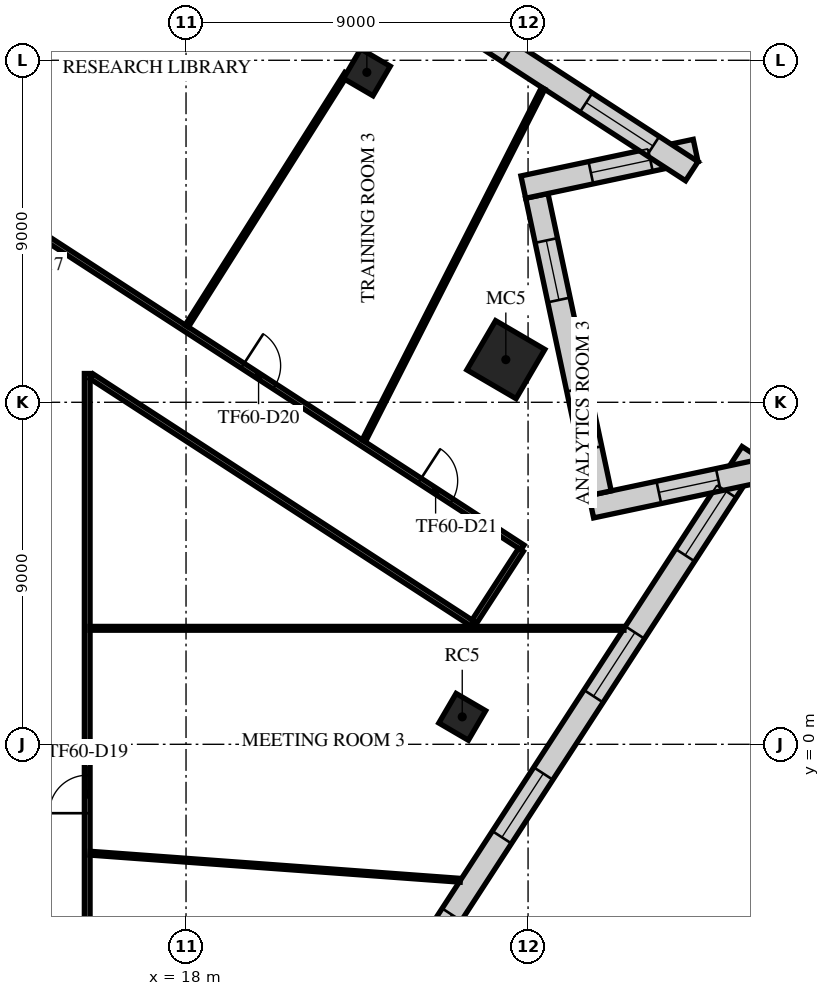
"""IFC4 building model, lengths in metres.
Left out: names, types, materials, properties, quantities, classifications, styles, units other than length and angle.
Written with IfcOpenShell. Run it as: python <this file> out.ifc"""

import sys

from ifc_helpers import new_model, si_unit, direction, frame, frame_2d, origin, origin_2d, place, context, subcontext, project, spatial, rectangle, extrude, element, fill, save


model = new_model("IFC4")
c1 = context("Model", 3, precision=1e-05, world=origin(), true_north=direction((0.0, 1.0)))
c2 = subcontext(c1, "Body", "Model", "MODEL_VIEW")
j1 = project(units=[si_unit("LENGTHUNIT", "METRE"), si_unit("PLANEANGLEUNIT", "RADIAN")], contexts=[c1])
p1 = place(None, origin())
s1 = spatial("IfcSite", under=j1, at=p1, CompositionType="ELEMENT")
p2 = place(p1, origin())
s2 = spatial("IfcBuilding", under=s1, at=p2, CompositionType="ELEMENT")
p3 = place(p2, frame((0.0, 0.0, 254.9)))
s3 = spatial("IfcBuildingStorey", under=s2, at=p3, CompositionType="ELEMENT", Elevation=254.9)
p4 = place(p3, frame((25.268, 0.722, 0.0), z_axis=(0.0, 0.0, 1.0), x_axis=(0.504643651291, 0.863327739165, 0.0)))
e1 = element("IfcColumn", 1, at=p4, inside=s3, PredefinedType="COLUMN", context=c2, shape_type="SweptSolid", body=[
    extrude(rectangle(XDim=0.9, YDim=0.9, at=origin_2d()), origin(), (0.0, 0.0, 1.0), 4.0),
])
p5 = place(p3, frame((26.415, 10.122, 0.0), z_axis=(0.0, 0.0, 1.0), x_axis=(0.504643651291, 0.863327739165, 0.0)))
e2 = element("IfcColumn", 2, at=p5, inside=s3, PredefinedType="COLUMN", context=c2, shape_type="SweptSolid", body=[
    extrude(rectangle(XDim=1.5, YDim=1.5, at=origin_2d()), origin(), (0.0, 0.0, 1.0), 4.0),
])
p6 = place(p3, frame((22.758, 17.682, 0.0), z_axis=(0.0, 0.0, 1.0), x_axis=(0.504643651291, 0.863327739165, 0.0)))
e3 = element("IfcColumn", 3, at=p6, inside=s3, PredefinedType="COLUMN", context=c2, shape_type="SweptSolid", body=[
    extrude(rectangle(XDim=0.9, YDim=0.9, at=origin_2d()), origin(), (0.0, 0.0, 1.0), 4.0),
])
p7 = place(p3, frame((6.367, -33.16, 0.0), z_axis=(0.0, 0.0, 1.0), x_axis=(0.544637371147, 0.838671648472, 0.0)))
e4 = element("IfcWall", 4, at=p7, inside=s3, PredefinedType="STANDARD", context=c2, shape_type="SweptSolid", body=[
    extrude(rectangle(XDim=48.686, YDim=0.6, at=frame_2d((24.343, 0.0))), origin(), (0.0, 0.0, 1.0), 3.64),
])
p8 = place(p7, frame((1.213, 0.0, 0.9)))
e5 = element("IfcOpeningElement", 5, at=p8, cuts=e4, PredefinedType="OPENING", context=c2, shape_type="SweptSolid", body=[
    extrude(rectangle(XDim=2.0, YDim=2.1, at=frame_2d((1.0, 1.05))), frame((0.0, 0.31, 0.0), z_axis=(0.0, -1.0, 0.0), x_axis=(1.0, 0.0, 0.0)), (0.0, 0.0, 1.0), 0.62),
])
p9 = place(p7, frame((5.639, 0.0, 0.9)))
e6 = element("IfcOpeningElement", 6, at=p9, cuts=e4, PredefinedType="OPENING", context=c2, shape_type="SweptSolid", body=[
    extrude(rectangle(XDim=2.0, YDim=2.1, at=frame_2d((1.0, 1.05))), frame((0.0, 0.31, 0.0), z_axis=(0.0, -1.0, 0.0), x_axis=(1.0, 0.0, 0.0)), (0.0, 0.0, 1.0), 0.62),
])
p10 = place(p7, frame((14.491, 0.0, 0.9)))
e7 = element("IfcOpeningElement", 7, at=p10, cuts=e4, PredefinedType="OPENING", context=c2, shape_type="SweptSolid", body=[
    extrude(rectangle(XDim=2.0, YDim=2.1, at=frame_2d((1.0, 1.05))), frame((0.0, 0.31, 0.0), z_axis=(0.0, -1.0, 0.0), x_axis=(1.0, 0.0, 0.0)), (0.0, 0.0, 1.0), 0.62),
])
p11 = place(p7, frame((18.917, 0.0, 0.9)))
e8 = element("IfcOpeningElement", 8, at=p11, cuts=e4, PredefinedType="OPENING", context=c2, shape_type="SweptSolid", body=[
    extrude(rectangle(XDim=2.0, YDim=2.1, at=frame_2d((1.0, 1.05))), frame((0.0, 0.31, 0.0), z_axis=(0.0, -1.0, 0.0), x_axis=(1.0, 0.0, 0.0)), (0.0, 0.0, 1.0), 0.62),
])
p12 = place(p7, frame((23.343, 0.0, 0.9)))
e9 = element("IfcOpeningElement", 9, at=p12, cuts=e4, PredefinedType="OPENING", context=c2, shape_type="SweptSolid", body=[
    extrude(rectangle(XDim=2.0, YDim=2.1, at=frame_2d((1.0, 1.05))), frame((0.0, 0.31, 0.0), z_axis=(0.0, -1.0, 0.0), x_axis=(1.0, 0.0, 0.0)), (0.0, 0.0, 1.0), 0.62),
])
p13 = place(p7, frame((27.769, 0.0, 0.9)))
e10 = element("IfcOpeningElement", 10, at=p13, cuts=e4, PredefinedType="OPENING", context=c2, shape_type="SweptSolid", body=[
    extrude(rectangle(XDim=2.0, YDim=2.1, at=frame_2d((1.0, 1.05))), frame((0.0, 0.31, 0.0), z_axis=(0.0, -1.0, 0.0), x_axis=(1.0, 0.0, 0.0)), (0.0, 0.0, 1.0), 0.62),
])
p14 = place(p7, frame((32.195, 0.0, 0.9)))
e11 = element("IfcOpeningElement", 11, at=p14, cuts=e4, PredefinedType="OPENING", context=c2, shape_type="SweptSolid", body=[
    extrude(rectangle(XDim=2.0, YDim=2.1, at=frame_2d((1.0, 1.05))), frame((0.0, 0.31, 0.0), z_axis=(0.0, -1.0, 0.0), x_axis=(1.0, 0.0, 0.0)), (0.0, 0.0, 1.0), 0.62),
])
p15 = place(p7, frame((36.621, 0.0, 0.9)))
e12 = element("IfcOpeningElement", 12, at=p15, cuts=e4, PredefinedType="OPENING", context=c2, shape_type="SweptSolid", body=[
    extrude(rectangle(XDim=2.0, YDim=2.1, at=frame_2d((1.0, 1.05))), frame((0.0, 0.31, 0.0), z_axis=(0.0, -1.0, 0.0), x_axis=(1.0, 0.0, 0.0)), (0.0, 0.0, 1.0), 0.62),
])
p16 = place(p7, frame((41.047, 0.0, 0.9)))
e13 = element("IfcOpeningElement", 13, at=p16, cuts=e4, PredefinedType="OPENING", context=c2, shape_type="SweptSolid", body=[
    extrude(rectangle(XDim=2.0, YDim=2.1, at=frame_2d((1.0, 1.05))), frame((0.0, 0.31, 0.0), z_axis=(0.0, -1.0, 0.0), x_axis=(1.0, 0.0, 0.0)), (0.0, 0.0, 1.0), 0.62),
])
p17 = place(p7, frame((45.473, 0.0, 0.9)))
e14 = element("IfcOpeningElement", 14, at=p17, cuts=e4, PredefinedType="OPENING", context=c2, shape_type="SweptSolid", body=[
    extrude(rectangle(XDim=2.0, YDim=2.1, at=frame_2d((1.0, 1.05))), frame((0.0, 0.31, 0.0), z_axis=(0.0, -1.0, 0.0), x_axis=(1.0, 0.0, 0.0)), (0.0, 0.0, 1.0), 0.62),
])
p18 = place(p3, frame((33.197, 7.215, 0.0), z_axis=(0.0, 0.0, 1.0), x_axis=(-0.978143321118, -0.207931823809, 0.0)))
e15 = element("IfcWall", 15, at=p18, inside=s3, PredefinedType="STANDARD", context=c2, shape_type="SweptSolid", body=[
    extrude(rectangle(XDim=4.635, YDim=0.6, at=frame_2d((2.318, 0.0))), origin(), (0.0, 0.0, 1.0), 3.64),
])
p19 = place(p18, frame((1.218, 0.0, 0.9)))
e16 = element("IfcOpeningElement", 16, at=p19, cuts=e15, PredefinedType="OPENING", context=c2, shape_type="SweptSolid", body=[
    extrude(rectangle(XDim=1.6, YDim=2.1, at=frame_2d((0.8, 1.05))), frame((0.0, 0.31, 0.0), z_axis=(0.0, -1.0, 0.0), x_axis=(1.0, 0.0, 0.0)), (0.0, 0.0, 1.0), 0.62),
])
p20 = place(p3, frame((28.894, 6.606, 0.0), z_axis=(0.0, 0.0, 1.0), x_axis=(-0.207886494942, 0.978152955943, 0.0)))
e17 = element("IfcWall", 17, at=p20, inside=s3, PredefinedType="STANDARD", context=c2, shape_type="SweptSolid", body=[
    extrude(rectangle(XDim=8.0, YDim=0.6, at=frame_2d((4.0, 0.0))), origin(), (0.0, 0.0, 1.0), 3.64),
])
p21 = place(p20, frame((1.2, 0.0, 0.9)))
e18 = element("IfcOpeningElement", 18, at=p21, cuts=e17, PredefinedType="OPENING", context=c2, shape_type="SweptSolid", body=[
    extrude(rectangle(XDim=1.6, YDim=2.1, at=frame_2d((0.8, 1.05))), frame((0.0, 0.31, 0.0), z_axis=(0.0, -1.0, 0.0), x_axis=(1.0, 0.0, 0.0)), (0.0, 0.0, 1.0), 0.62),
])
p22 = place(p20, frame((5.2, 0.0, 0.9)))
e19 = element("IfcOpeningElement", 19, at=p22, cuts=e17, PredefinedType="OPENING", context=c2, shape_type="SweptSolid", body=[
    extrude(rectangle(XDim=1.6, YDim=2.1, at=frame_2d((0.8, 1.05))), frame((0.0, 0.31, 0.0), z_axis=(0.0, -1.0, 0.0), x_axis=(1.0, 0.0, 0.0)), (0.0, 0.0, 1.0), 0.62),
])
p23 = place(p3, frame((26.875, 14.663, 0.0), z_axis=(0.0, 0.0, 1.0), x_axis=(0.978145598061, 0.207921112429, 0.0)))
e20 = element("IfcWall", 20, at=p23, inside=s3, PredefinedType="STANDARD", context=c2, shape_type="SweptSolid", body=[
    extrude(rectangle(XDim=4.636, YDim=0.6, at=frame_2d((2.318, 0.0))), origin(), (0.0, 0.0, 1.0), 3.64),
])
p24 = place(p23, frame((1.818, 0.0, 0.9)))
e21 = element("IfcOpeningElement", 21, at=p24, cuts=e20, PredefinedType="OPENING", context=c2, shape_type="SweptSolid", body=[
    extrude(rectangle(XDim=1.6, YDim=2.1, at=frame_2d((0.8, 1.05))), frame((0.0, 0.31, 0.0), z_axis=(0.0, -1.0, 0.0), x_axis=(1.0, 0.0, 0.0)), (0.0, 0.0, 1.0), 0.62),
])
p25 = place(p3, frame((31.308, 15.082, 0.0), z_axis=(0.0, 0.0, 1.0), x_axis=(-0.838672242303, 0.544636456721, 0.0)))
e22 = element("IfcWall", 22, at=p25, inside=s3, PredefinedType="STANDARD", context=c2, shape_type="SweptSolid", body=[
    extrude(rectangle(XDim=36.243, YDim=0.6, at=frame_2d((18.122, 0.0))), origin(), (0.0, 0.0, 1.0), 3.64),
])
p26 = place(p25, frame((1.215, 0.0, 0.9)))
e23 = element("IfcOpeningElement", 23, at=p26, cuts=e22, PredefinedType="OPENING", context=c2, shape_type="SweptSolid", body=[
    extrude(rectangle(XDim=2.1, YDim=2.1, at=frame_2d((1.05, 1.05))), frame((0.0, 0.31, 0.0), z_axis=(0.0, -1.0, 0.0), x_axis=(1.0, 0.0, 0.0)), (0.0, 0.0, 1.0), 0.62),
])
p27 = place(p25, frame((5.746, 0.0, 0.9)))
e24 = element("IfcOpeningElement", 24, at=p27, cuts=e22, PredefinedType="OPENING", context=c2, shape_type="SweptSolid", body=[
    extrude(rectangle(XDim=2.1, YDim=2.1, at=frame_2d((1.05, 1.05))), frame((0.0, 0.31, 0.0), z_axis=(0.0, -1.0, 0.0), x_axis=(1.0, 0.0, 0.0)), (0.0, 0.0, 1.0), 0.62),
])
p28 = place(p25, frame((10.276, 0.0, 0.9)))
e25 = element("IfcOpeningElement", 25, at=p28, cuts=e22, PredefinedType="OPENING", context=c2, shape_type="SweptSolid", body=[
    extrude(rectangle(XDim=2.1, YDim=2.1, at=frame_2d((1.05, 1.05))), frame((0.0, 0.31, 0.0), z_axis=(0.0, -1.0, 0.0), x_axis=(1.0, 0.0, 0.0)), (0.0, 0.0, 1.0), 0.62),
])
p29 = place(p25, frame((14.806, 0.0, 0.9)))
e26 = element("IfcOpeningElement", 26, at=p29, cuts=e22, PredefinedType="OPENING", context=c2, shape_type="SweptSolid", body=[
    extrude(rectangle(XDim=2.1, YDim=2.1, at=frame_2d((1.05, 1.05))), frame((0.0, 0.31, 0.0), z_axis=(0.0, -1.0, 0.0), x_axis=(1.0, 0.0, 0.0)), (0.0, 0.0, 1.0), 0.62),
])
p30 = place(p25, frame((19.337, 0.0, 0.9)))
e27 = element("IfcOpeningElement", 27, at=p30, cuts=e22, PredefinedType="OPENING", context=c2, shape_type="SweptSolid", body=[
    extrude(rectangle(XDim=2.1, YDim=2.1, at=frame_2d((1.05, 1.05))), frame((0.0, 0.31, 0.0), z_axis=(0.0, -1.0, 0.0), x_axis=(1.0, 0.0, 0.0)), (0.0, 0.0, 1.0), 0.62),
])
p31 = place(p25, frame((23.867, 0.0, 0.9)))
e28 = element("IfcOpeningElement", 28, at=p31, cuts=e22, PredefinedType="OPENING", context=c2, shape_type="SweptSolid", body=[
    extrude(rectangle(XDim=2.1, YDim=2.1, at=frame_2d((1.05, 1.05))), frame((0.0, 0.31, 0.0), z_axis=(0.0, -1.0, 0.0), x_axis=(1.0, 0.0, 0.0)), (0.0, 0.0, 1.0), 0.62),
])
p32 = place(p25, frame((28.398, 0.0, 0.9)))
e29 = element("IfcOpeningElement", 29, at=p32, cuts=e22, PredefinedType="OPENING", context=c2, shape_type="SweptSolid", body=[
    extrude(rectangle(XDim=2.1, YDim=2.1, at=frame_2d((1.05, 1.05))), frame((0.0, 0.31, 0.0), z_axis=(0.0, -1.0, 0.0), x_axis=(1.0, 0.0, 0.0)), (0.0, 0.0, 1.0), 0.62),
])
p33 = place(p25, frame((32.928, 0.0, 0.9)))
e30 = element("IfcOpeningElement", 30, at=p33, cuts=e22, PredefinedType="OPENING", context=c2, shape_type="SweptSolid", body=[
    extrude(rectangle(XDim=2.1, YDim=2.1, at=frame_2d((1.05, 1.05))), frame((0.0, 0.31, 0.0), z_axis=(0.0, -1.0, 0.0), x_axis=(1.0, 0.0, 0.0)), (0.0, 0.0, 1.0), 0.62),
])
p34 = place(p3, frame((-6.127, 26.598, 0.0), z_axis=(0.0, 0.0, 1.0), x_axis=(0.838670911559, -0.544638505897, 0.0)))
e31 = element("IfcWall", 31, at=p34, inside=s3, PredefinedType="PARTITIONING", context=c2, shape_type="SweptSolid", body=[
    extrude(rectangle(XDim=39.325, YDim=0.15, at=frame_2d((19.663, 0.0))), origin(), (0.0, 0.0, 1.0), 3.04),
])
p35 = place(p34, frame((9.3, 0.0, 0.0)))
e32 = element("IfcOpeningElement", 32, at=p35, cuts=e31, PredefinedType="OPENING", context=c2, shape_type="SweptSolid", body=[
    extrude(rectangle(XDim=1.8, YDim=2.1, at=frame_2d((0.9, 1.05))), frame((0.0, 0.085, 0.0), z_axis=(0.0, -1.0, 0.0), x_axis=(1.0, 0.0, 0.0)), (0.0, 0.0, 1.0), 0.17),
])
p36 = place(p34, frame((12.185, 0.0, 0.0)))
e33 = element("IfcOpeningElement", 33, at=p36, cuts=e31, PredefinedType="OPENING", context=c2, shape_type="SweptSolid", body=[
    extrude(rectangle(XDim=1.0, YDim=2.1, at=frame_2d((0.5, 1.05))), frame((0.0, 0.085, 0.0), z_axis=(0.0, -1.0, 0.0), x_axis=(1.0, 0.0, 0.0)), (0.0, 0.0, 1.0), 0.17),
])
p37 = place(p34, frame((23.155, 0.0, 0.0)))
e34 = element("IfcOpeningElement", 34, at=p37, cuts=e31, PredefinedType="OPENING", context=c2, shape_type="SweptSolid", body=[
    extrude(rectangle(XDim=1.0, YDim=2.1, at=frame_2d((0.5, 1.05))), frame((0.0, 0.085, 0.0), z_axis=(0.0, -1.0, 0.0), x_axis=(1.0, 0.0, 0.0)), (0.0, 0.0, 1.0), 0.17),
])
p38 = place(p34, frame((30.544, 0.0, 0.0)))
e35 = element("IfcOpeningElement", 35, at=p38, cuts=e31, PredefinedType="OPENING", context=c2, shape_type="SweptSolid", body=[
    extrude(rectangle(XDim=1.0, YDim=2.1, at=frame_2d((0.5, 1.05))), frame((0.0, 0.085, 0.0), z_axis=(0.0, -1.0, 0.0), x_axis=(1.0, 0.0, 0.0)), (0.0, 0.0, 1.0), 0.17),
])
p39 = place(p34, frame((36.099, 0.0, 0.0)))
e36 = element("IfcOpeningElement", 36, at=p39, cuts=e31, PredefinedType="OPENING", context=c2, shape_type="SweptSolid", body=[
    extrude(rectangle(XDim=1.0, YDim=2.1, at=frame_2d((0.5, 1.05))), frame((0.0, 0.085, 0.0), z_axis=(0.0, -1.0, 0.0), x_axis=(1.0, 0.0, 0.0)), (0.0, 0.0, 1.0), 0.17),
])
p40 = place(p3, frame((15.4, -15.325, 0.0), z_axis=(0.0, 0.0, 1.0), x_axis=(0.0, 1.0, 0.0)))
e37 = element("IfcWall", 37, at=p40, inside=s3, PredefinedType="PARTITIONING", context=c2, shape_type="SweptSolid", body=[
    extrude(rectangle(XDim=25.082, YDim=0.15, at=frame_2d((12.541, 0.0))), origin(), (0.0, 0.0, 1.0), 3.24),
])
p41 = place(p40, frame((6.847, 0.0, 0.0)))
e38 = element("IfcOpeningElement", 38, at=p41, cuts=e37, PredefinedType="OPENING", context=c2, shape_type="SweptSolid", body=[
    extrude(rectangle(XDim=1.0, YDim=2.1, at=frame_2d((0.5, 1.05))), frame((0.0, 0.085, 0.0), z_axis=(0.0, -1.0, 0.0), x_axis=(1.0, 0.0, 0.0)), (0.0, 0.0, 1.0), 0.17),
])
p42 = place(p40, frame((13.512, 0.0, 0.0)))
e39 = element("IfcOpeningElement", 39, at=p42, cuts=e37, PredefinedType="OPENING", context=c2, shape_type="SweptSolid", body=[
    extrude(rectangle(XDim=1.0, YDim=2.1, at=frame_2d((0.5, 1.05))), frame((0.0, 0.085, 0.0), z_axis=(0.0, -1.0, 0.0), x_axis=(1.0, 0.0, 0.0)), (0.0, 0.0, 1.0), 0.17),
])
p43 = place(p3, frame((15.516, 9.682, 0.0), z_axis=(0.0, 0.0, 1.0), x_axis=(0.838687901934, -0.544612342083, 0.0)))
e40 = element("IfcWall", 40, at=p43, inside=s3, PredefinedType="PARTITIONING", context=c2, shape_type="SweptSolid", body=[
    extrude(rectangle(XDim=11.961, YDim=0.15, at=frame_2d((5.98, 0.0))), origin(), (0.0, 0.0, 1.0), 3.04),
])
p44 = place(p3, frame((25.588, 3.231, 0.0), z_axis=(0.0, 0.0, 1.0), x_axis=(0.544690717141, 0.838637002916, 0.0)))
e41 = element("IfcWall", 41, at=p44, inside=s3, PredefinedType="PARTITIONING", context=c2, shape_type="SweptSolid", body=[
    extrude(rectangle(XDim=2.249, YDim=0.15, at=frame_2d((1.125, 0.0))), origin(), (0.0, 0.0, 1.0), 3.04),
])
p45 = place(p3, frame((11.194, 15.445, 0.0), z_axis=(0.0, 0.0, 1.0), x_axis=(0.461705411455, 0.887033321264, 0.0)))
e42 = element("IfcWall", 42, at=p45, inside=s3, PredefinedType="PARTITIONING", context=c2, shape_type="SweptSolid", body=[
    extrude(rectangle(XDim=10.396, YDim=0.1, at=frame_2d((5.198, 0.0))), origin(), (0.0, 0.0, 1.0), 3.04),
])
p46 = place(p3, frame((15.475, 3.052, 0.0), z_axis=(0.0, 0.0, 1.0), x_axis=(1.0, 0.0, 0.0)))
e43 = element("IfcWall", 43, at=p46, inside=s3, PredefinedType="PARTITIONING", context=c2, shape_type="SweptSolid", body=[
    extrude(rectangle(XDim=14.048, YDim=0.1, at=frame_2d((7.024, 0.0))), origin(), (0.0, 0.0, 1.0), 3.04),
])
p47 = place(p3, frame((15.479, -2.866, 0.0), z_axis=(0.0, 0.0, 1.0), x_axis=(0.997329416564, -0.073034477181, 0.0)))
e44 = element("IfcWall", 44, at=p47, inside=s3, PredefinedType="PARTITIONING", context=c2, shape_type="SweptSolid", body=[
    extrude(rectangle(XDim=9.764, YDim=0.1, at=frame_2d((4.882, 0.0))), origin(), (0.0, 0.0, 1.0), 3.04),
])
p48 = place(p3, frame((18.021, 11.007, 0.0), z_axis=(0.0, 0.0, 1.0), x_axis=(0.53413665333, 0.845398152097, 0.0)))
e45 = element("IfcWall", 45, at=p48, inside=s3, PredefinedType="PARTITIONING", context=c2, shape_type="SweptSolid", body=[
    extrude(rectangle(XDim=7.864, YDim=0.1, at=frame_2d((3.932, 0.0))), origin(), (0.0, 0.0, 1.0), 3.24),
])
p49 = place(p3, frame((22.679, 7.987, 0.0), z_axis=(0.0, 0.0, 1.0), x_axis=(0.453387595121, 0.891313462588, 0.0)))
e46 = element("IfcWall", 46, at=p49, inside=s3, PredefinedType="PARTITIONING", context=c2, shape_type="SweptSolid", body=[
    extrude(rectangle(XDim=10.406, YDim=0.1, at=frame_2d((5.203, 0.0))), origin(), (0.0, 0.0, 1.0), 3.04),
])
p50 = place(p14, origin())
e47 = element("IfcWindow", 47, at=p50, inside=s3, PartitioningType="SINGLE_PANEL", PredefinedType="WINDOW", context=c2, shape_type="SweptSolid", body=[
    extrude(rectangle(XDim=2.0, YDim=2.1, at=frame_2d((1.0, 1.05))), frame((0.0, 0.03, 0.0), z_axis=(0.0, -1.0, 0.0), x_axis=(1.0, 0.0, 0.0)), (0.0, 0.0, 1.0), 0.06),
])
fill(e11, e47)
p51 = place(p15, origin())
e48 = element("IfcWindow", 48, at=p51, inside=s3, PartitioningType="SINGLE_PANEL", PredefinedType="WINDOW", context=c2, shape_type="SweptSolid", body=[
    extrude(rectangle(XDim=2.0, YDim=2.1, at=frame_2d((1.0, 1.05))), frame((0.0, 0.03, 0.0), z_axis=(0.0, -1.0, 0.0), x_axis=(1.0, 0.0, 0.0)), (0.0, 0.0, 1.0), 0.06),
])
fill(e12, e48)
p52 = place(p16, origin())
e49 = element("IfcWindow", 49, at=p52, inside=s3, PartitioningType="SINGLE_PANEL", PredefinedType="WINDOW", context=c2, shape_type="SweptSolid", body=[
    extrude(rectangle(XDim=2.0, YDim=2.1, at=frame_2d((1.0, 1.05))), frame((0.0, 0.03, 0.0), z_axis=(0.0, -1.0, 0.0), x_axis=(1.0, 0.0, 0.0)), (0.0, 0.0, 1.0), 0.06),
])
fill(e13, e49)
p53 = place(p17, origin())
e50 = element("IfcWindow", 50, at=p53, inside=s3, PartitioningType="SINGLE_PANEL", PredefinedType="WINDOW", context=c2, shape_type="SweptSolid", body=[
    extrude(rectangle(XDim=2.0, YDim=2.1, at=frame_2d((1.0, 1.05))), frame((0.0, 0.03, 0.0), z_axis=(0.0, -1.0, 0.0), x_axis=(1.0, 0.0, 0.0)), (0.0, 0.0, 1.0), 0.06),
])
fill(e14, e50)
p54 = place(p19, origin())
e51 = element("IfcWindow", 51, at=p54, inside=s3, PartitioningType="SINGLE_PANEL", PredefinedType="WINDOW", context=c2, shape_type="SweptSolid", body=[
    extrude(rectangle(XDim=1.6, YDim=2.1, at=frame_2d((0.8, 1.05))), frame((0.0, 0.03, 0.0), z_axis=(0.0, -1.0, 0.0), x_axis=(1.0, 0.0, 0.0)), (0.0, 0.0, 1.0), 0.06),
])
fill(e16, e51)
p55 = place(p21, origin())
e52 = element("IfcWindow", 52, at=p55, inside=s3, PartitioningType="SINGLE_PANEL", PredefinedType="WINDOW", context=c2, shape_type="SweptSolid", body=[
    extrude(rectangle(XDim=1.6, YDim=2.1, at=frame_2d((0.8, 1.05))), frame((0.0, 0.03, 0.0), z_axis=(0.0, -1.0, 0.0), x_axis=(1.0, 0.0, 0.0)), (0.0, 0.0, 1.0), 0.06),
])
fill(e18, e52)
p56 = place(p22, origin())
e53 = element("IfcWindow", 53, at=p56, inside=s3, PartitioningType="SINGLE_PANEL", PredefinedType="WINDOW", context=c2, shape_type="SweptSolid", body=[
    extrude(rectangle(XDim=1.6, YDim=2.1, at=frame_2d((0.8, 1.05))), frame((0.0, 0.03, 0.0), z_axis=(0.0, -1.0, 0.0), x_axis=(1.0, 0.0, 0.0)), (0.0, 0.0, 1.0), 0.06),
])
fill(e19, e53)
p57 = place(p24, origin())
e54 = element("IfcWindow", 54, at=p57, inside=s3, PartitioningType="SINGLE_PANEL", PredefinedType="WINDOW", context=c2, shape_type="SweptSolid", body=[
    extrude(rectangle(XDim=1.6, YDim=2.1, at=frame_2d((0.8, 1.05))), frame((0.0, 0.03, 0.0), z_axis=(0.0, -1.0, 0.0), x_axis=(1.0, 0.0, 0.0)), (0.0, 0.0, 1.0), 0.06),
])
fill(e21, e54)
p58 = place(p26, origin())
e55 = element("IfcWindow", 55, at=p58, inside=s3, PartitioningType="SINGLE_PANEL", PredefinedType="WINDOW", context=c2, shape_type="SweptSolid", body=[
    extrude(rectangle(XDim=2.1, YDim=2.1, at=frame_2d((1.05, 1.05))), frame((0.0, 0.03, 0.0), z_axis=(0.0, -1.0, 0.0), x_axis=(1.0, 0.0, 0.0)), (0.0, 0.0, 1.0), 0.06),
])
fill(e23, e55)
p59 = place(p27, origin())
e56 = element("IfcWindow", 56, at=p59, inside=s3, PartitioningType="SINGLE_PANEL", PredefinedType="WINDOW", context=c2, shape_type="SweptSolid", body=[
    extrude(rectangle(XDim=2.1, YDim=2.1, at=frame_2d((1.05, 1.05))), frame((0.0, 0.03, 0.0), z_axis=(0.0, -1.0, 0.0), x_axis=(1.0, 0.0, 0.0)), (0.0, 0.0, 1.0), 0.06),
])
fill(e24, e56)
p60 = place(p42, frame((1.0, 0.0, 0.0), z_axis=(0.0, 0.0, 1.0), x_axis=(-1.0, 0.0, 0.0)))
e57 = element("IfcDoor", 57, at=p60, inside=s3, OperationType="SINGLE_SWING_LEFT", PredefinedType="DOOR", context=c2, shape_type="SweptSolid", body=[
    extrude(rectangle(XDim=1.0, YDim=2.1, at=frame_2d((0.5, 1.05))), frame((0.0, 0.025, 0.0), z_axis=(0.0, -1.0, 0.0), x_axis=(1.0, 0.0, 0.0)), (0.0, 0.0, 1.0), 0.05),
])
fill(e39, e57)
p61 = place(p38, origin())
e58 = element("IfcDoor", 58, at=p61, inside=s3, OperationType="SINGLE_SWING_RIGHT", PredefinedType="DOOR", context=c2, shape_type="SweptSolid", body=[
    extrude(rectangle(XDim=1.0, YDim=2.1, at=frame_2d((0.5, 1.05))), frame((0.0, 0.025, 0.0), z_axis=(0.0, -1.0, 0.0), x_axis=(1.0, 0.0, 0.0)), (0.0, 0.0, 1.0), 0.05),
])
fill(e35, e58)
p62 = place(p39, origin())
e59 = element("IfcDoor", 59, at=p62, inside=s3, OperationType="SINGLE_SWING_RIGHT", PredefinedType="DOOR", context=c2, shape_type="SweptSolid", body=[
    extrude(rectangle(XDim=1.0, YDim=2.1, at=frame_2d((0.5, 1.05))), frame((0.0, 0.025, 0.0), z_axis=(0.0, -1.0, 0.0), x_axis=(1.0, 0.0, 0.0)), (0.0, 0.0, 1.0), 0.05),
])
fill(e36, e59)
save(model, sys.argv[1])
